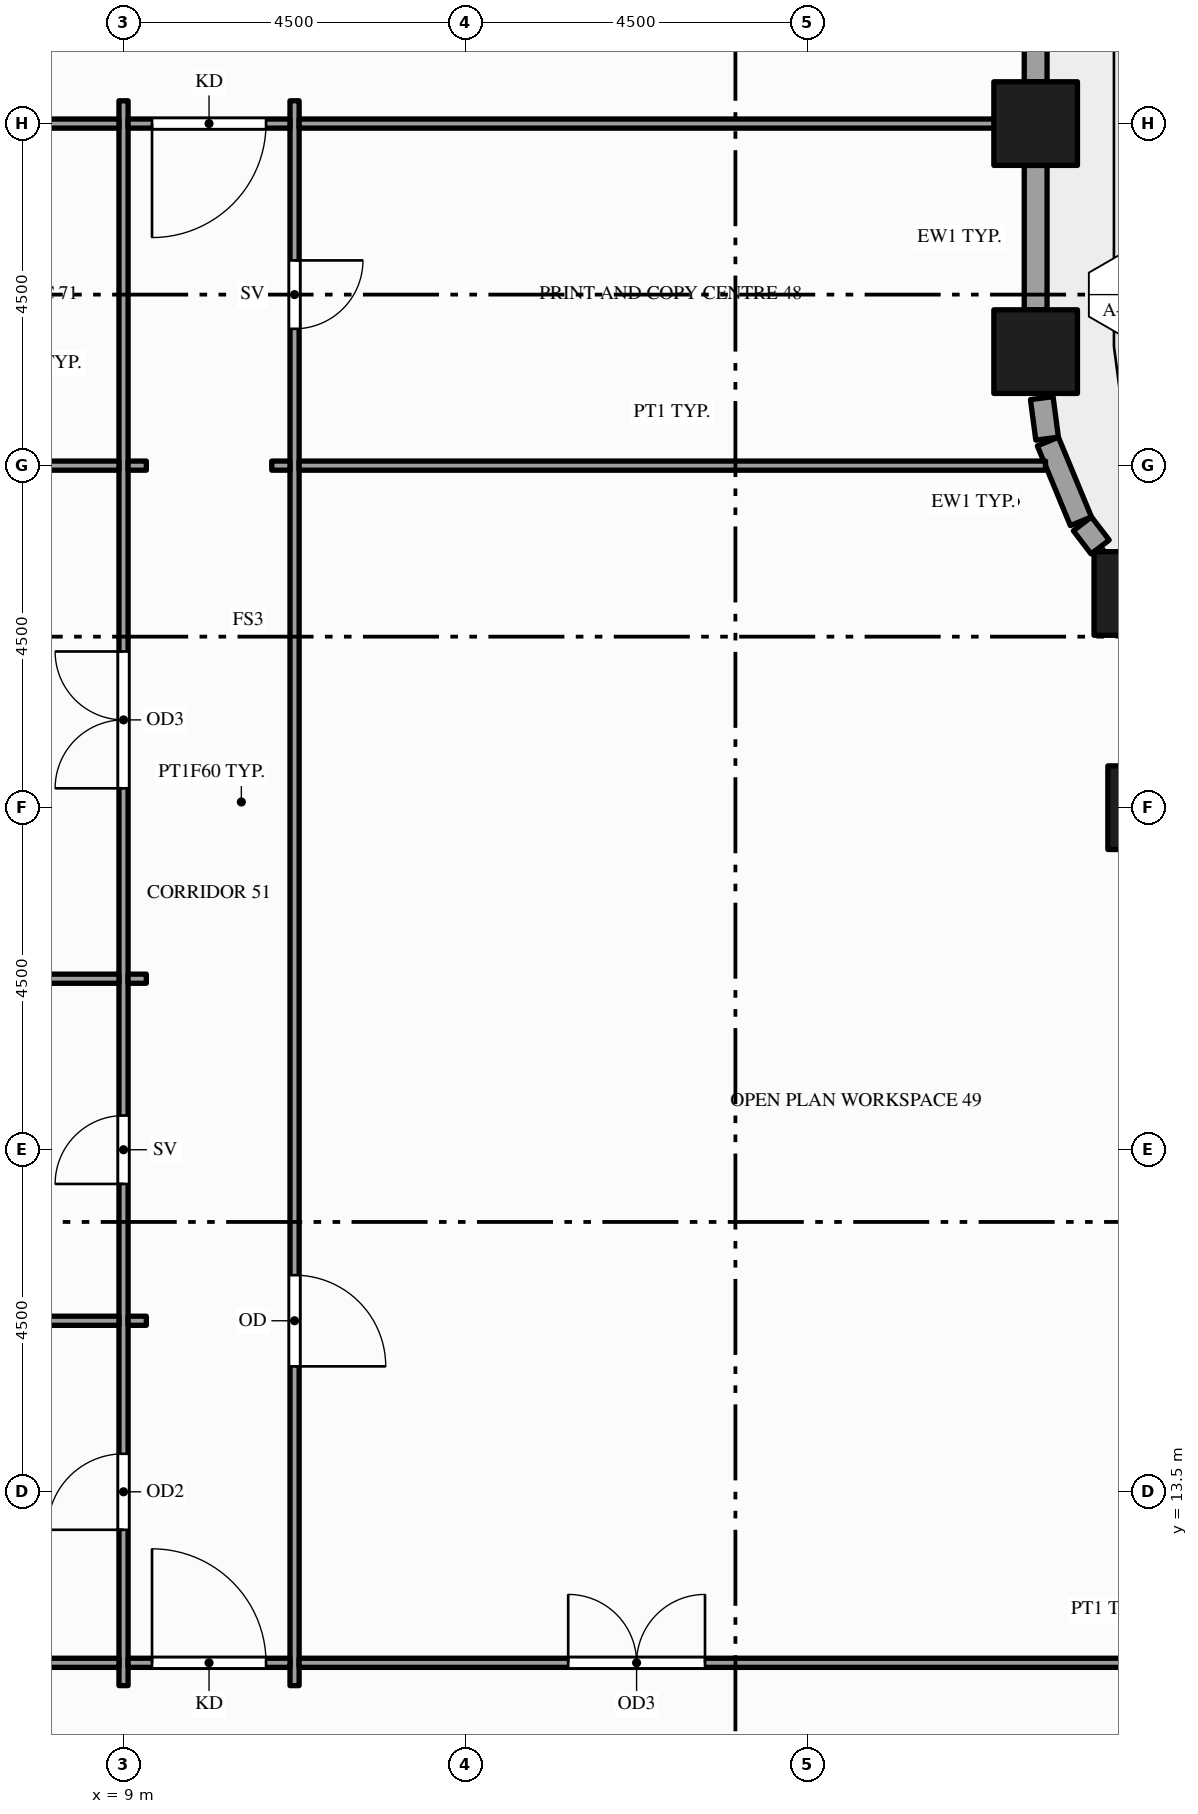
"""IFC4 building model, lengths in metres.
Left out: names, types, materials, properties, quantities, classifications, styles, units other than length and angle.
Written with IfcOpenShell. Run it as: python <this file> out.ifc"""

import sys

from ifc_helpers import new_model, si_unit, direction, frame, frame_2d, origin, origin_2d, place, context, subcontext, project, spatial, rectangle, hollow_rectangle, extrude, element, fill, save


model = new_model("IFC4")
c1 = context("Model", 3, precision=1e-05, world=origin(), true_north=direction((0.0, 1.0)))
c2 = subcontext(c1, "Body", "Model", "MODEL_VIEW")
j1 = project(units=[si_unit("LENGTHUNIT", "METRE"), si_unit("PLANEANGLEUNIT", "RADIAN")], contexts=[c1])
p1 = place(None, origin())
s1 = spatial("IfcSite", under=j1, at=p1, CompositionType="ELEMENT")
p2 = place(p1, origin())
s2 = spatial("IfcBuilding", under=s1, at=p2, CompositionType="ELEMENT")
p3 = place(p2, frame((0.0, 0.0, 29.0)))
s3 = spatial("IfcBuildingStorey", under=s2, at=p3, CompositionType="ELEMENT", Elevation=29.0)
for number, where, z_axis, x_axis in (
    (1, (21.0, 28.5, -0.3), (0.0, 0.0, 1.0), (1.0, 0.0, 0.0)),
    (2, (21.0, 31.5, -0.3), (0.0, 0.0, 1.0), (1.0, 0.0, 0.0)),
    (3, (22.318, 25.318, -0.3), (0.0, 0.0, 1.0), (1.0, 0.0, 0.0)),
):
    element("IfcColumn", number, at=place(p3, frame(where, z_axis=z_axis, x_axis=x_axis)), inside=s3, PredefinedType="COLUMN", context=c2, shape_type="SweptSolid", body=[
        extrude(hollow_rectangle(XDim=1.1, YDim=1.1, WallThickness=0.06, at=origin_2d()), origin(), (0.0, 0.0, 1.0), 4.15),
    ])
p4 = place(p3, frame((22.5, 22.5, -0.15), z_axis=(0.0, 0.0, 1.0), x_axis=(1.0, 0.0, 0.0)))
e4 = element("IfcColumn", 4, at=p4, inside=s3, PredefinedType="COLUMN", context=c2, shape_type="SweptSolid", body=[
    extrude(hollow_rectangle(XDim=1.1, YDim=1.1, WallThickness=0.06, at=origin_2d()), origin(), (0.0, 0.0, 1.0), 4.0),
])
p5 = place(p3, frame((21.849, 25.93, 0.0), z_axis=(0.0, 0.0, 1.0), x_axis=(-0.60851163405, 0.79354495224, 0.0)))
e5 = element("IfcWall", 5, at=p5, inside=s3, PredefinedType="STANDARD", context=c2, shape_type="SweptSolid", body=[
    extrude(rectangle(XDim=0.384, YDim=0.3, at=frame_2d((0.192, 0.0))), origin(), (0.0, 0.0, 1.0), 3.144),
])
p6 = place(p3, frame((21.595, 26.268, 0.0), z_axis=(0.0, 0.0, 1.0), x_axis=(-0.382598720491, 0.923914616768, 0.0)))
e6 = element("IfcWall", 6, at=p6, inside=s3, PredefinedType="STANDARD", context=c2, shape_type="SweptSolid", body=[
    extrude(rectangle(XDim=1.135, YDim=0.3, at=frame_2d((0.568, 0.0))), origin(), (0.0, 0.0, 1.0), 3.144),
])
p7 = place(p3, frame((21.151, 27.355, 0.0), z_axis=(0.0, 0.0, 1.0), x_axis=(-0.130736330569, 0.991417173479, 0.0)))
e7 = element("IfcWall", 7, at=p7, inside=s3, PredefinedType="STANDARD", context=c2, shape_type="SweptSolid", body=[
    extrude(rectangle(XDim=0.538, YDim=0.3, at=frame_2d((0.269, 0.0))), origin(), (0.0, 0.0, 1.0), 3.144),
])
p8 = place(p3, frame((21.0, 29.05, 0.0), z_axis=(0.0, 0.0, 1.0), x_axis=(0.0, 1.0, 0.0)))
e8 = element("IfcWall", 8, at=p8, inside=s3, PredefinedType="STANDARD", context=c2, shape_type="SweptSolid", body=[
    extrude(rectangle(XDim=1.9, YDim=0.3, at=frame_2d((0.95, 0.0))), origin(), (0.0, 0.0, 1.0), 3.144),
])
p9 = place(p3, frame((21.0, 32.05, 0.0), z_axis=(0.0, 0.0, 1.0), x_axis=(0.0, 1.0, 0.0)))
e9 = element("IfcWall", 9, at=p9, inside=s3, PredefinedType="STANDARD", context=c2, shape_type="SweptSolid", body=[
    extrude(rectangle(XDim=3.95, YDim=0.3, at=frame_2d((1.975, 0.0))), origin(), (0.0, 0.0, 1.0), 3.144),
])
p10 = place(p9, frame((1.075, 0.0, 0.0)))
e10 = element("IfcOpeningElement", 10, at=p10, cuts=e9, PredefinedType="OPENING", context=c2, shape_type="SweptSolid", body=[
    extrude(rectangle(XDim=1.8, YDim=2.4, at=frame_2d((0.9, 1.2))), frame((0.0, 0.16, 0.0), z_axis=(0.0, -1.0, 0.0), x_axis=(1.0, 0.0, 0.0)), (0.0, 0.0, 1.0), 0.32),
])
p11 = place(p3, frame((9.0, 10.95, 0.0), z_axis=(0.0, 0.0, 1.0), x_axis=(0.0, 1.0, 0.0)))
e11 = element("IfcWall", 11, at=p11, inside=s3, PredefinedType="PARTITIONING", context=c2, shape_type="SweptSolid", body=[
    extrude(rectangle(XDim=20.85, YDim=0.12, at=frame_2d((10.425, 0.0))), origin(), (0.0, 0.0, 1.0), 2.6),
])
p12 = place(p11, frame((2.05, 0.0, 0.0)))
e12 = element("IfcOpeningElement", 12, at=p12, cuts=e11, PredefinedType="OPENING", context=c2, shape_type="SweptSolid", body=[
    extrude(rectangle(XDim=1.0, YDim=2.1, at=frame_2d((0.5, 1.05))), frame((0.0, 0.07, 0.0), z_axis=(0.0, -1.0, 0.0), x_axis=(1.0, 0.0, 0.0)), (0.0, 0.0, 1.0), 0.14),
])
p13 = place(p11, frame((6.6, 0.0, 0.0)))
e13 = element("IfcOpeningElement", 13, at=p13, cuts=e11, PredefinedType="OPENING", context=c2, shape_type="SweptSolid", body=[
    extrude(rectangle(XDim=0.9, YDim=2.1, at=frame_2d((0.45, 1.05))), frame((0.0, 0.07, 0.0), z_axis=(0.0, -1.0, 0.0), x_axis=(1.0, 0.0, 0.0)), (0.0, 0.0, 1.0), 0.14),
])
p14 = place(p11, frame((11.805, 0.0, 0.0)))
e14 = element("IfcOpeningElement", 14, at=p14, cuts=e11, PredefinedType="OPENING", context=c2, shape_type="SweptSolid", body=[
    extrude(rectangle(XDim=1.8, YDim=2.1, at=frame_2d((0.9, 1.05))), frame((0.0, 0.07, 0.0), z_axis=(0.0, -1.0, 0.0), x_axis=(1.0, 0.0, 0.0)), (0.0, 0.0, 1.0), 0.14),
])
p15 = place(p3, frame((11.25, 10.95, 0.0), z_axis=(0.0, 0.0, 1.0), x_axis=(0.0, 1.0, 0.0)))
e15 = element("IfcWall", 15, at=p15, inside=s3, PredefinedType="PARTITIONING", context=c2, shape_type="SweptSolid", body=[
    extrude(rectangle(XDim=20.85, YDim=0.12, at=frame_2d((10.425, 0.0))), origin(), (0.0, 0.0, 1.0), 2.6),
])
p16 = place(p15, frame((17.85, 0.0, 0.0)))
e16 = element("IfcOpeningElement", 16, at=p16, cuts=e15, PredefinedType="OPENING", context=c2, shape_type="SweptSolid", body=[
    extrude(rectangle(XDim=0.9, YDim=2.1, at=frame_2d((0.45, 1.05))), frame((0.0, 0.07, 0.0), z_axis=(0.0, -1.0, 0.0), x_axis=(1.0, 0.0, 0.0)), (0.0, 0.0, 1.0), 0.14),
])
p17 = place(p15, frame((4.2, 0.0, 0.0)))
e17 = element("IfcOpeningElement", 17, at=p17, cuts=e15, PredefinedType="OPENING", context=c2, shape_type="SweptSolid", body=[
    extrude(rectangle(XDim=1.2, YDim=2.1, at=frame_2d((0.6, 1.05))), frame((0.0, 0.07, 0.0), z_axis=(0.0, -1.0, 0.0), x_axis=(1.0, 0.0, 0.0)), (0.0, 0.0, 1.0), 0.14),
])
p18 = place(p3, frame((0.15, 11.25, 0.0), z_axis=(0.0, 0.0, 1.0), x_axis=(1.0, 0.0, 0.0)))
e18 = element("IfcWall", 18, at=p18, inside=s3, PredefinedType="PARTITIONING", context=c2, shape_type="SweptSolid", body=[
    extrude(rectangle(XDim=8.79, YDim=0.12, at=frame_2d((4.395, 0.0))), origin(), (0.0, 0.0, 1.0), 2.938),
])
p19 = place(p3, frame((9.06, 11.25, 0.0), z_axis=(0.0, 0.0, 1.0), x_axis=(1.0, 0.0, 0.0)))
e19 = element("IfcWall", 19, at=p19, inside=s3, PredefinedType="PARTITIONING", context=c2, shape_type="SweptSolid", body=[
    extrude(rectangle(XDim=2.13, YDim=0.12, at=frame_2d((1.065, 0.0))), origin(), (0.0, 0.0, 1.0), 2.938),
])
p20 = place(p19, frame((0.315, 0.0, 0.0)))
e20 = element("IfcOpeningElement", 20, at=p20, cuts=e19, PredefinedType="OPENING", context=c2, shape_type="SweptSolid", body=[
    extrude(rectangle(XDim=1.5, YDim=2.1, at=frame_2d((0.75, 1.05))), frame((0.0, 0.07, 0.0), z_axis=(0.0, -1.0, 0.0), x_axis=(1.0, 0.0, 0.0)), (0.0, 0.0, 1.0), 0.14),
])
p21 = place(p3, frame((11.31, 11.25, 0.0), z_axis=(0.0, 0.0, 1.0), x_axis=(1.0, 0.0, 0.0)))
e21 = element("IfcWall", 21, at=p21, inside=s3, PredefinedType="PARTITIONING", context=c2, shape_type="SweptSolid", body=[
    extrude(rectangle(XDim=15.63, YDim=0.12, at=frame_2d((7.815, 0.0))), origin(), (0.0, 0.0, 1.0), 2.938),
])
p22 = place(p21, frame((3.54, 0.0, 0.0)))
e22 = element("IfcOpeningElement", 22, at=p22, cuts=e21, PredefinedType="OPENING", context=c2, shape_type="SweptSolid", body=[
    extrude(rectangle(XDim=1.8, YDim=2.1, at=frame_2d((0.9, 1.05))), frame((0.0, 0.07, 0.0), z_axis=(0.0, -1.0, 0.0), x_axis=(1.0, 0.0, 0.0)), (0.0, 0.0, 1.0), 0.14),
])
p23 = place(p3, frame((0.15, 15.75, 0.0), z_axis=(0.0, 0.0, 1.0), x_axis=(1.0, 0.0, 0.0)))
e23 = element("IfcWall", 23, at=p23, inside=s3, PredefinedType="PARTITIONING", context=c2, shape_type="SweptSolid", body=[
    extrude(rectangle(XDim=8.79, YDim=0.12, at=frame_2d((4.395, 0.0))), origin(), (0.0, 0.0, 1.0), 2.938),
])
p24 = place(p3, frame((9.06, 15.75, 0.0), z_axis=(0.0, 0.0, 1.0), x_axis=(1.0, 0.0, 0.0)))
e24 = element("IfcWall", 24, at=p24, inside=s3, PredefinedType="PARTITIONING", context=c2, shape_type="SweptSolid", body=[
    extrude(rectangle(XDim=0.24, YDim=0.12, at=frame_2d((0.12, 0.0))), origin(), (0.0, 0.0, 1.0), 2.938),
])
p25 = place(p3, frame((0.15, 20.25, 0.0), z_axis=(0.0, 0.0, 1.0), x_axis=(1.0, 0.0, 0.0)))
e25 = element("IfcWall", 25, at=p25, inside=s3, PredefinedType="PARTITIONING", context=c2, shape_type="SweptSolid", body=[
    extrude(rectangle(XDim=8.79, YDim=0.12, at=frame_2d((4.395, 0.0))), origin(), (0.0, 0.0, 1.0), 2.938),
])
p26 = place(p3, frame((9.06, 20.25, 0.0), z_axis=(0.0, 0.0, 1.0), x_axis=(1.0, 0.0, 0.0)))
e26 = element("IfcWall", 26, at=p26, inside=s3, PredefinedType="PARTITIONING", context=c2, shape_type="SweptSolid", body=[
    extrude(rectangle(XDim=0.24, YDim=0.12, at=frame_2d((0.12, 0.0))), origin(), (0.0, 0.0, 1.0), 2.938),
])
p27 = place(p3, frame((5.56, 27.0, 0.0), z_axis=(0.0, 0.0, 1.0), x_axis=(1.0, 0.0, 0.0)))
e27 = element("IfcWall", 27, at=p27, inside=s3, PredefinedType="PARTITIONING", context=c2, shape_type="SweptSolid", body=[
    extrude(rectangle(XDim=3.38, YDim=0.12, at=frame_2d((1.69, 0.0))), origin(), (0.0, 0.0, 1.0), 2.938),
])
for number, where, z_axis, x_axis in (
    (28, (9.06, 27.0, 0.0), (0.0, 0.0, 1.0), (1.0, 0.0, 0.0)),
    (29, (10.95, 27.0, 0.0), (0.0, 0.0, 1.0), (1.0, 0.0, 0.0)),
):
    element("IfcWall", number, at=place(p3, frame(where, z_axis=z_axis, x_axis=x_axis)), inside=s3, PredefinedType="PARTITIONING", context=c2, shape_type="SweptSolid", body=[
        extrude(rectangle(XDim=0.24, YDim=0.12, at=frame_2d((0.12, 0.0))), origin(), (0.0, 0.0, 1.0), 2.938),
    ])
p28 = place(p3, frame((11.31, 27.0, 0.0), z_axis=(0.0, 0.0, 1.0), x_axis=(1.0, 0.0, 0.0)))
e30 = element("IfcWall", 30, at=p28, inside=s3, PredefinedType="PARTITIONING", context=c2, shape_type="SweptSolid", body=[
    extrude(rectangle(XDim=9.82, YDim=0.12, at=frame_2d((4.91, 0.0))), origin(), (0.0, 0.0, 1.0), 2.938),
])
p29 = place(p3, frame((5.56, 31.5, 0.0), z_axis=(0.0, 0.0, 1.0), x_axis=(1.0, 0.0, 0.0)))
e31 = element("IfcWall", 31, at=p29, inside=s3, PredefinedType="PARTITIONING", context=c2, shape_type="SweptSolid", body=[
    extrude(rectangle(XDim=3.38, YDim=0.12, at=frame_2d((1.69, 0.0))), origin(), (0.0, 0.0, 1.0), 2.938),
])
p30 = place(p29, frame((1.19, 0.0, 0.0)))
e32 = element("IfcOpeningElement", 32, at=p30, cuts=e31, PredefinedType="OPENING", context=c2, shape_type="SweptSolid", body=[
    extrude(rectangle(XDim=1.0, YDim=2.1, at=frame_2d((0.5, 1.05))), frame((0.0, 0.07, 0.0), z_axis=(0.0, -1.0, 0.0), x_axis=(1.0, 0.0, 0.0)), (0.0, 0.0, 1.0), 0.14),
])
p31 = place(p3, frame((9.06, 31.5, 0.0), z_axis=(0.0, 0.0, 1.0), x_axis=(1.0, 0.0, 0.0)))
e33 = element("IfcWall", 33, at=p31, inside=s3, PredefinedType="PARTITIONING", context=c2, shape_type="SweptSolid", body=[
    extrude(rectangle(XDim=2.13, YDim=0.12, at=frame_2d((1.065, 0.0))), origin(), (0.0, 0.0, 1.0), 2.938),
])
p32 = place(p31, frame((0.315, 0.0, 0.0)))
e34 = element("IfcOpeningElement", 34, at=p32, cuts=e33, PredefinedType="OPENING", context=c2, shape_type="SweptSolid", body=[
    extrude(rectangle(XDim=1.5, YDim=2.1, at=frame_2d((0.75, 1.05))), frame((0.0, 0.07, 0.0), z_axis=(0.0, -1.0, 0.0), x_axis=(1.0, 0.0, 0.0)), (0.0, 0.0, 1.0), 0.14),
])
p33 = place(p3, frame((11.31, 31.5, 0.0), z_axis=(0.0, 0.0, 1.0), x_axis=(1.0, 0.0, 0.0)))
e35 = element("IfcWall", 35, at=p33, inside=s3, PredefinedType="PARTITIONING", context=c2, shape_type="SweptSolid", body=[
    extrude(rectangle(XDim=9.54, YDim=0.12, at=frame_2d((4.77, 0.0))), origin(), (0.0, 0.0, 1.0), 2.938),
])
p34 = place(p22, origin())
e36 = element("IfcDoor", 36, at=p34, inside=s3, OperationType="DOUBLE_DOOR_SINGLE_SWING", PredefinedType="DOOR", context=c2, shape_type="SweptSolid", body=[
    extrude(rectangle(XDim=1.8, YDim=2.1, at=frame_2d((0.9, 1.05))), frame((0.0, 0.025, 0.0), z_axis=(0.0, -1.0, 0.0), x_axis=(1.0, 0.0, 0.0)), (0.0, 0.0, 1.0), 0.05),
])
fill(e22, e36)
p35 = place(p20, origin())
e37 = element("IfcDoor", 37, at=p35, inside=s3, OperationType="SINGLE_SWING_LEFT", PredefinedType="DOOR", context=c2, shape_type="SweptSolid", body=[
    extrude(rectangle(XDim=1.5, YDim=2.1, at=frame_2d((0.75, 1.05))), frame((0.0, 0.025, 0.0), z_axis=(0.0, -1.0, 0.0), x_axis=(1.0, 0.0, 0.0)), (0.0, 0.0, 1.0), 0.05),
])
fill(e20, e37)
p36 = place(p32, origin())
e38 = element("IfcDoor", 38, at=p36, inside=s3, OperationType="SINGLE_SWING_LEFT", PredefinedType="DOOR", context=c2, shape_type="SweptSolid", body=[
    extrude(rectangle(XDim=1.5, YDim=2.1, at=frame_2d((0.75, 1.05))), frame((0.0, 0.025, 0.0), z_axis=(0.0, -1.0, 0.0), x_axis=(1.0, 0.0, 0.0)), (0.0, 0.0, 1.0), 0.05),
])
fill(e34, e38)
p37 = place(p12, origin())
e39 = element("IfcDoor", 39, at=p37, inside=s3, OperationType="SINGLE_SWING_LEFT", PredefinedType="DOOR", context=c2, shape_type="SweptSolid", body=[
    extrude(rectangle(XDim=1.0, YDim=2.1, at=frame_2d((0.5, 1.05))), frame((0.0, 0.025, 0.0), z_axis=(0.0, -1.0, 0.0), x_axis=(1.0, 0.0, 0.0)), (0.0, 0.0, 1.0), 0.05),
])
fill(e12, e39)
p38 = place(p13, origin())
e40 = element("IfcDoor", 40, at=p38, inside=s3, OperationType="SINGLE_SWING_LEFT", PredefinedType="DOOR", context=c2, shape_type="SweptSolid", body=[
    extrude(rectangle(XDim=0.9, YDim=2.1, at=frame_2d((0.45, 1.05))), frame((0.0, 0.025, 0.0), z_axis=(0.0, -1.0, 0.0), x_axis=(1.0, 0.0, 0.0)), (0.0, 0.0, 1.0), 0.05),
])
fill(e13, e40)
p39 = place(p14, origin())
e41 = element("IfcDoor", 41, at=p39, inside=s3, OperationType="DOUBLE_DOOR_SINGLE_SWING", PredefinedType="DOOR", context=c2, shape_type="SweptSolid", body=[
    extrude(rectangle(XDim=1.8, YDim=2.1, at=frame_2d((0.9, 1.05))), frame((0.0, 0.025, 0.0), z_axis=(0.0, -1.0, 0.0), x_axis=(1.0, 0.0, 0.0)), (0.0, 0.0, 1.0), 0.05),
])
fill(e14, e41)
p40 = place(p16, origin())
e42 = element("IfcDoor", 42, at=p40, inside=s3, OperationType="SINGLE_SWING_RIGHT", PredefinedType="DOOR", context=c2, shape_type="SweptSolid", body=[
    extrude(rectangle(XDim=0.9, YDim=2.1, at=frame_2d((0.45, 1.05))), frame((0.0, 0.025, 0.0), z_axis=(0.0, -1.0, 0.0), x_axis=(1.0, 0.0, 0.0)), (0.0, 0.0, 1.0), 0.05),
])
fill(e16, e42)
p41 = place(p17, origin())
e43 = element("IfcDoor", 43, at=p41, inside=s3, OperationType="SINGLE_SWING_LEFT", PredefinedType="DOOR", context=c2, shape_type="SweptSolid", body=[
    extrude(rectangle(XDim=1.2, YDim=2.1, at=frame_2d((0.6, 1.05))), frame((0.0, 0.025, 0.0), z_axis=(0.0, -1.0, 0.0), x_axis=(1.0, 0.0, 0.0)), (0.0, 0.0, 1.0), 0.05),
])
fill(e17, e43)
save(model, sys.argv[1])
